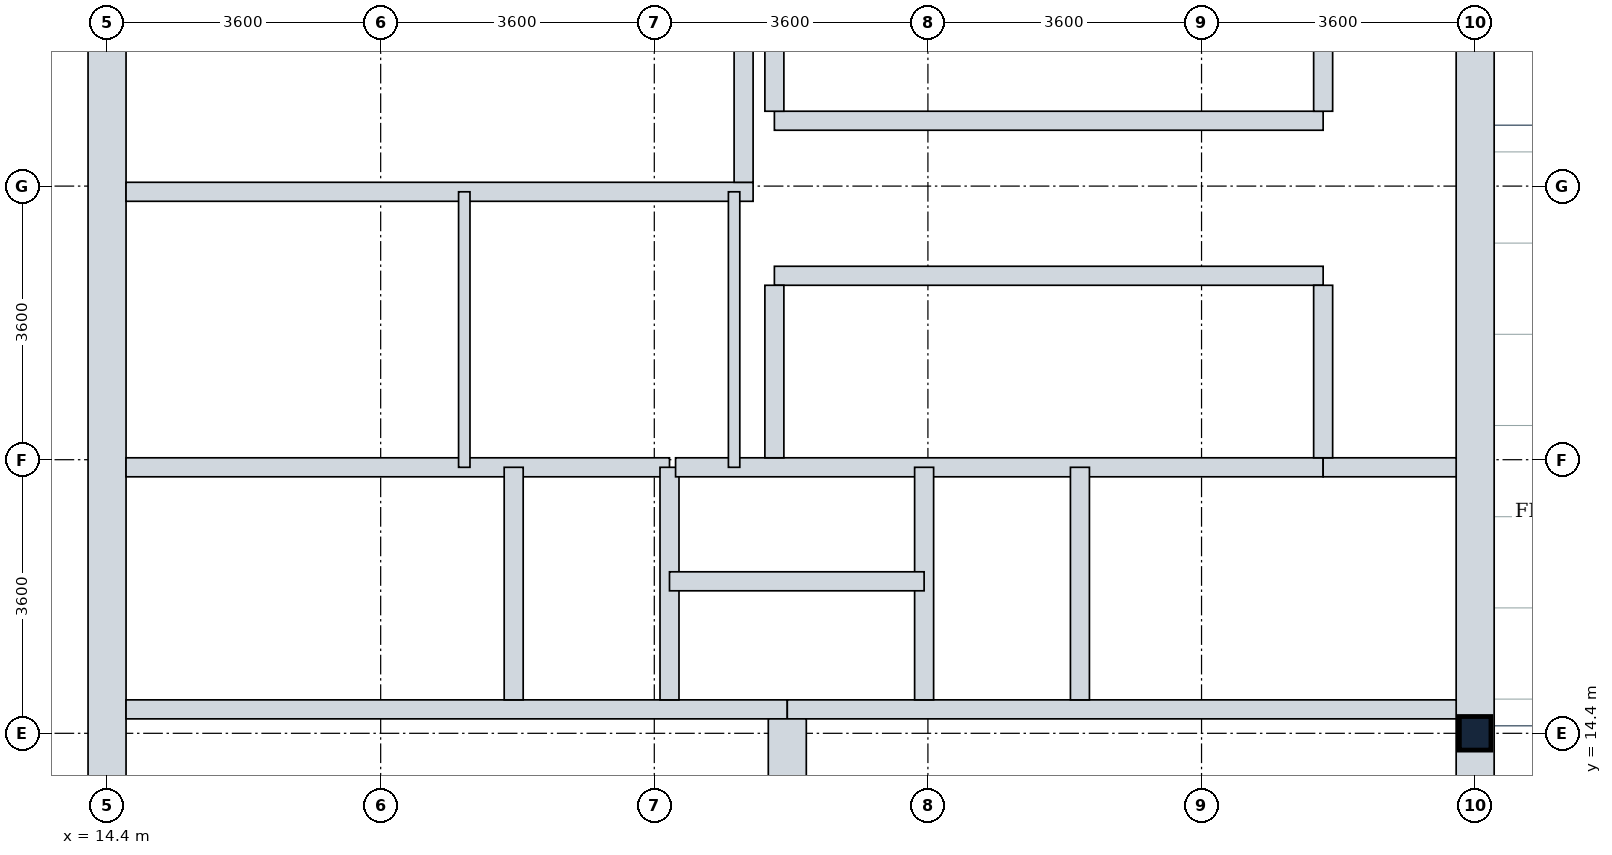
"""IFC4 building model, lengths in metres.
Left out: names, types, materials, properties, quantities, classifications, styles, units other than length and angle.
Written with IfcOpenShell. Run it as: python <this file> out.ifc"""

import sys

from ifc_helpers import new_model, si_unit, direction, frame, frame_2d, origin, origin_2d, place, context, subcontext, project, spatial, rectangle, i_section, extrude, element, fill, save


model = new_model("IFC4")
c1 = context("Model", 3, precision=1e-05, world=origin(), true_north=direction((0.0, 1.0)))
c2 = subcontext(c1, "Body", "Model", "MODEL_VIEW")
j1 = project(units=[si_unit("LENGTHUNIT", "METRE"), si_unit("PLANEANGLEUNIT", "RADIAN")], contexts=[c1])
p1 = place(None, origin())
s1 = spatial("IfcSite", under=j1, at=p1, CompositionType="ELEMENT")
p2 = place(p1, origin())
s2 = spatial("IfcBuilding", under=s1, at=p2, CompositionType="ELEMENT")
p3 = place(p2, frame((0.0, 0.0, 139.0)))
s3 = spatial("IfcBuildingStorey", under=s2, at=p3, CompositionType="ELEMENT", Elevation=139.0)
p4 = place(p3, frame((32.4, 14.4, 0.0), z_axis=(0.0, 0.0, 1.0), x_axis=(1.0, 0.0, 0.0)))
e1 = element("IfcColumn", 1, at=p4, inside=s3, PredefinedType="COLUMN", context=c2, shape_type="SweptSolid", body=[
    extrude(i_section(OverallWidth=0.416, OverallDepth=0.442, WebThickness=0.025, FlangeThickness=0.041, FilletRadius=0.015, at=origin_2d()), origin(), (0.0, 0.0, 1.0), 3.8),
])
p5 = place(p3, frame((14.4, 10.8, 0.0), z_axis=(0.0, 0.0, 1.0), x_axis=(0.0, 1.0, 0.0)))
e2 = element("IfcWall", 2, at=p5, inside=s3, PredefinedType="SHEAR", context=c2, shape_type="SweptSolid", body=[
    extrude(rectangle(XDim=14.4, YDim=0.5, at=frame_2d((7.2, 0.0))), origin(), (0.0, 0.0, 1.0), 3.55),
])
p6 = place(p5, frame((11.05, 0.0, 0.0)))
e3 = element("IfcOpeningElement", 3, at=p6, cuts=e2, PredefinedType="OPENING", context=c2, shape_type="SweptSolid", body=[
    extrude(rectangle(XDim=1.1, YDim=2.1, at=frame_2d((0.55, 1.05))), frame((0.0, 0.26, 0.0), z_axis=(0.0, -1.0, 0.0), x_axis=(1.0, 0.0, 0.0)), (0.0, 0.0, 1.0), 0.52),
])
p7 = place(p5, frame((4.9, 0.0, 0.0)))
e4 = element("IfcOpeningElement", 4, at=p7, cuts=e2, PredefinedType="OPENING", context=c2, shape_type="SweptSolid", body=[
    extrude(rectangle(XDim=1.2, YDim=2.1, at=frame_2d((0.6, 1.05))), frame((0.0, 0.26, 0.0), z_axis=(0.0, -1.0, 0.0), x_axis=(1.0, 0.0, 0.0)), (0.0, 0.0, 1.0), 0.52),
])
p8 = place(p5, frame((8.15, 0.0, 0.0)))
e5 = element("IfcOpeningElement", 5, at=p8, cuts=e2, PredefinedType="OPENING", context=c2, shape_type="SweptSolid", body=[
    extrude(rectangle(XDim=0.9, YDim=2.1, at=frame_2d((0.45, 1.05))), frame((0.0, 0.26, 0.0), z_axis=(0.0, -1.0, 0.0), x_axis=(1.0, 0.0, 0.0)), (0.0, 0.0, 1.0), 0.52),
])
p9 = place(p3, frame((32.4, 10.8, 0.0), z_axis=(0.0, 0.0, 1.0), x_axis=(0.0, 1.0, 0.0)))
e6 = element("IfcWall", 6, at=p9, inside=s3, PredefinedType="SHEAR", context=c2, shape_type="SweptSolid", body=[
    extrude(rectangle(XDim=14.4, YDim=0.5, at=frame_2d((7.2, 0.0))), origin(), (0.0, 0.0, 1.0), 3.55),
])
p10 = place(p9, frame((4.35, 0.0, 0.0)))
e7 = element("IfcOpeningElement", 7, at=p10, cuts=e6, PredefinedType="OPENING", context=c2, shape_type="SweptSolid", body=[
    extrude(rectangle(XDim=1.2, YDim=2.1, at=frame_2d((0.6, 1.05))), frame((0.0, 0.26, 0.0), z_axis=(0.0, -1.0, 0.0), x_axis=(1.0, 0.0, 0.0)), (0.0, 0.0, 1.0), 0.52),
])
p11 = place(p9, frame((10.0, 0.0, 0.0)))
e8 = element("IfcOpeningElement", 8, at=p11, cuts=e6, PredefinedType="OPENING", context=c2, shape_type="SweptSolid", body=[
    extrude(rectangle(XDim=1.2, YDim=2.1, at=frame_2d((0.6, 1.05))), frame((0.0, 0.26, 0.0), z_axis=(0.0, -1.0, 0.0), x_axis=(1.0, 0.0, 0.0)), (0.0, 0.0, 1.0), 0.52),
])
p12 = place(p3, frame((14.65, 14.715, 0.0), z_axis=(0.0, 0.0, 1.0), x_axis=(1.0, 0.0, 0.0)))
e9 = element("IfcWall", 9, at=p12, inside=s3, PredefinedType="SHEAR", context=c2, shape_type="SweptSolid", body=[
    extrude(rectangle(XDim=8.7, YDim=0.25, at=frame_2d((4.35, 0.0))), origin(), (0.0, 0.0, 1.0), 3.55),
])
p13 = place(p12, frame((0.705, 0.0, 0.0)))
e10 = element("IfcOpeningElement", 10, at=p13, cuts=e9, PredefinedType="OPENING", context=c2, shape_type="SweptSolid", body=[
    extrude(rectangle(XDim=1.1, YDim=2.1, at=frame_2d((0.55, 1.05))), frame((0.0, 0.135, 0.0), z_axis=(0.0, -1.0, 0.0), x_axis=(1.0, 0.0, 0.0)), (0.0, 0.0, 1.0), 0.27),
])
p14 = place(p3, frame((23.35, 14.715, 0.0), z_axis=(0.0, 0.0, 1.0), x_axis=(1.0, 0.0, 0.0)))
e11 = element("IfcWall", 11, at=p14, inside=s3, PredefinedType="SHEAR", context=c2, shape_type="SweptSolid", body=[
    extrude(rectangle(XDim=8.8, YDim=0.25, at=frame_2d((4.4, 0.0))), origin(), (0.0, 0.0, 1.0), 3.55),
])
p15 = place(p14, frame((6.775, 0.0, 0.0)))
e12 = element("IfcOpeningElement", 12, at=p15, cuts=e11, PredefinedType="OPENING", context=c2, shape_type="SweptSolid", body=[
    extrude(rectangle(XDim=1.1, YDim=2.1, at=frame_2d((0.55, 1.05))), frame((0.0, 0.135, 0.0), z_axis=(0.0, -1.0, 0.0), x_axis=(1.0, 0.0, 0.0)), (0.0, 0.0, 1.0), 0.27),
])
p16 = place(p3, frame((23.35, 11.75, 0.0), z_axis=(0.0, 0.0, 1.0), x_axis=(0.0, 1.0, 0.0)))
e13 = element("IfcWall", 13, at=p16, inside=s3, PredefinedType="SHEAR", context=c2, shape_type="SweptSolid", body=[
    extrude(rectangle(XDim=2.84, YDim=0.5, at=frame_2d((1.42, 0.0))), origin(), (0.0, 0.0, 1.0), 3.55),
])
p17 = place(p3, frame((14.65, 21.525, 0.0), z_axis=(0.0, 0.0, 1.0), x_axis=(1.0, 0.0, 0.0)))
e14 = element("IfcWall", 14, at=p17, inside=s3, PredefinedType="SHEAR", context=c2, shape_type="SweptSolid", body=[
    extrude(rectangle(XDim=8.25, YDim=0.25, at=frame_2d((4.125, 0.0))), origin(), (0.0, 0.0, 1.0), 3.55),
])
p18 = place(p3, frame((22.775, 21.65, 0.0), z_axis=(0.0, 0.0, 1.0), x_axis=(0.0, 1.0, 0.0)))
e15 = element("IfcWall", 15, at=p18, inside=s3, PredefinedType="SHEAR", context=c2, shape_type="SweptSolid", body=[
    extrude(rectangle(XDim=2.84, YDim=0.25, at=frame_2d((1.42, 0.0))), origin(), (0.0, 0.0, 1.0), 3.55),
])
p19 = place(p3, frame((14.65, 17.9, 0.0), z_axis=(0.0, 0.0, 1.0), x_axis=(1.0, 0.0, 0.0)))
e16 = element("IfcWall", 16, at=p19, inside=s3, PredefinedType="PARTITIONING", context=c2, shape_type="SweptSolid", body=[
    extrude(rectangle(XDim=7.15, YDim=0.25, at=frame_2d((3.575, 0.0))), origin(), (0.0, 0.0, 1.0), 3.535),
])
p20 = place(p3, frame((19.75, 14.84, 0.0), z_axis=(0.0, 0.0, 1.0), x_axis=(0.0, 1.0, 0.0)))
e17 = element("IfcWall", 17, at=p20, inside=s3, PredefinedType="PARTITIONING", context=c2, shape_type="SweptSolid", body=[
    extrude(rectangle(XDim=3.06, YDim=0.25, at=frame_2d((1.53, 0.0))), origin(), (0.0, 0.0, 1.0), 3.535),
])
p21 = place(p20, frame((0.98, 0.0, 0.0)))
e18 = element("IfcOpeningElement", 18, at=p21, cuts=e17, PredefinedType="OPENING", context=c2, shape_type="SweptSolid", body=[
    extrude(rectangle(XDim=1.1, YDim=2.1, at=frame_2d((0.55, 1.05))), frame((0.0, 0.135, 0.0), z_axis=(0.0, -1.0, 0.0), x_axis=(1.0, 0.0, 0.0)), (0.0, 0.0, 1.0), 0.27),
])
p22 = place(p3, frame((21.8, 14.84, 0.0), z_axis=(0.0, 0.0, 1.0), x_axis=(0.0, 1.0, 0.0)))
e19 = element("IfcWall", 19, at=p22, inside=s3, PredefinedType="PARTITIONING", context=c2, shape_type="SweptSolid", body=[
    extrude(rectangle(XDim=3.06, YDim=0.25, at=frame_2d((1.53, 0.0))), origin(), (0.0, 0.0, 1.0), 3.535),
])
p23 = place(p3, frame((21.88, 17.9, 0.0), z_axis=(0.0, 0.0, 1.0), x_axis=(1.0, 0.0, 0.0)))
e20 = element("IfcWall", 20, at=p23, inside=s3, PredefinedType="PARTITIONING", context=c2, shape_type="SweptSolid", body=[
    extrude(rectangle(XDim=8.52, YDim=0.25, at=frame_2d((4.26, 0.0))), origin(), (0.0, 0.0, 1.0), 3.535),
])
p24 = place(p3, frame((30.4, 17.9, 0.0), z_axis=(0.0, 0.0, 1.0), x_axis=(1.0, 0.0, 0.0)))
e21 = element("IfcWall", 21, at=p24, inside=s3, PredefinedType="PARTITIONING", context=c2, shape_type="SweptSolid", body=[
    extrude(rectangle(XDim=1.75, YDim=0.25, at=frame_2d((0.875, 0.0))), origin(), (0.0, 0.0, 1.0), 3.535),
])
p25 = place(p24, frame((0.32, 0.0, 0.0)))
e22 = element("IfcOpeningElement", 22, at=p25, cuts=e21, PredefinedType="OPENING", context=c2, shape_type="SweptSolid", body=[
    extrude(rectangle(XDim=1.1, YDim=2.1, at=frame_2d((0.55, 1.05))), frame((0.0, 0.135, 0.0), z_axis=(0.0, -1.0, 0.0), x_axis=(1.0, 0.0, 0.0)), (0.0, 0.0, 1.0), 0.27),
])
p26 = place(p3, frame((25.15, 14.84, 0.0), z_axis=(0.0, 0.0, 1.0), x_axis=(0.0, 1.0, 0.0)))
e23 = element("IfcWall", 23, at=p26, inside=s3, PredefinedType="PARTITIONING", context=c2, shape_type="SweptSolid", body=[
    extrude(rectangle(XDim=3.06, YDim=0.25, at=frame_2d((1.53, 0.0))), origin(), (0.0, 0.0, 1.0), 3.535),
])
p27 = place(p3, frame((27.2, 14.84, 0.0), z_axis=(0.0, 0.0, 1.0), x_axis=(0.0, 1.0, 0.0)))
e24 = element("IfcWall", 24, at=p27, inside=s3, PredefinedType="PARTITIONING", context=c2, shape_type="SweptSolid", body=[
    extrude(rectangle(XDim=3.06, YDim=0.25, at=frame_2d((1.53, 0.0))), origin(), (0.0, 0.0, 1.0), 3.535),
])
p28 = place(p27, frame((0.98, 0.0, 0.0)))
e25 = element("IfcOpeningElement", 25, at=p28, cuts=e24, PredefinedType="OPENING", context=c2, shape_type="SweptSolid", body=[
    extrude(rectangle(XDim=1.1, YDim=2.1, at=frame_2d((0.55, 1.05))), frame((0.0, 0.135, 0.0), z_axis=(0.0, -1.0, 0.0), x_axis=(1.0, 0.0, 0.0)), (0.0, 0.0, 1.0), 0.27),
])
p29 = place(p3, frame((21.8, 16.4, 0.0), z_axis=(0.0, 0.0, 1.0), x_axis=(1.0, 0.0, 0.0)))
e26 = element("IfcWall", 26, at=p29, inside=s3, PredefinedType="PARTITIONING", context=c2, shape_type="SweptSolid", body=[
    extrude(rectangle(XDim=3.35, YDim=0.25, at=frame_2d((1.675, 0.0))), origin(), (0.0, 0.0, 1.0), 3.535),
])
p30 = place(p3, frame((23.18, 20.42, 0.0), z_axis=(0.0, 0.0, 1.0), x_axis=(1.0, 0.0, 0.0)))
e27 = element("IfcWall", 27, at=p30, inside=s3, PredefinedType="PARTITIONING", context=c2, shape_type="SweptSolid", body=[
    extrude(rectangle(XDim=7.22, YDim=0.25, at=frame_2d((3.61, 0.0))), origin(), (0.0, 0.0, 1.0), 3.535),
])
p31 = place(p30, frame((0.41, 0.0, 0.0)))
e28 = element("IfcOpeningElement", 28, at=p31, cuts=e27, PredefinedType="OPENING", context=c2, shape_type="SweptSolid", body=[
    extrude(rectangle(XDim=1.1, YDim=2.1, at=frame_2d((0.55, 1.05))), frame((0.0, 0.135, 0.0), z_axis=(0.0, -1.0, 0.0), x_axis=(1.0, 0.0, 0.0)), (0.0, 0.0, 1.0), 0.27),
])
p32 = place(p30, frame((2.19, 0.0, 0.0)))
e29 = element("IfcOpeningElement", 29, at=p32, cuts=e27, PredefinedType="OPENING", context=c2, shape_type="SweptSolid", body=[
    extrude(rectangle(XDim=1.1, YDim=2.1, at=frame_2d((0.55, 1.05))), frame((0.0, 0.135, 0.0), z_axis=(0.0, -1.0, 0.0), x_axis=(1.0, 0.0, 0.0)), (0.0, 0.0, 1.0), 0.27),
])
p33 = place(p30, frame((3.97, 0.0, 0.0)))
e30 = element("IfcOpeningElement", 30, at=p33, cuts=e27, PredefinedType="OPENING", context=c2, shape_type="SweptSolid", body=[
    extrude(rectangle(XDim=1.1, YDim=2.1, at=frame_2d((0.55, 1.05))), frame((0.0, 0.135, 0.0), z_axis=(0.0, -1.0, 0.0), x_axis=(1.0, 0.0, 0.0)), (0.0, 0.0, 1.0), 0.27),
])
p34 = place(p30, frame((5.75, 0.0, 0.0)))
e31 = element("IfcOpeningElement", 31, at=p34, cuts=e27, PredefinedType="OPENING", context=c2, shape_type="SweptSolid", body=[
    extrude(rectangle(XDim=1.1, YDim=2.1, at=frame_2d((0.55, 1.05))), frame((0.0, 0.135, 0.0), z_axis=(0.0, -1.0, 0.0), x_axis=(1.0, 0.0, 0.0)), (0.0, 0.0, 1.0), 0.27),
])
for number, where, z_axis, x_axis in (
    (32, (23.18, 18.025, 0.0), (0.0, 0.0, 1.0), (0.0, 1.0, 0.0)),
    (33, (30.4, 18.025, 0.0), (0.0, 0.0, 1.0), (0.0, 1.0, 0.0)),
):
    element("IfcWall", number, at=place(p3, frame(where, z_axis=z_axis, x_axis=x_axis)), inside=s3, PredefinedType="PARTITIONING", context=c2, shape_type="SweptSolid", body=[
        extrude(rectangle(XDim=2.27, YDim=0.25, at=frame_2d((1.135, 0.0))), origin(), (0.0, 0.0, 1.0), 3.535),
    ])
p35 = place(p3, frame((23.18, 22.46, 0.0), z_axis=(0.0, 0.0, 1.0), x_axis=(1.0, 0.0, 0.0)))
e34 = element("IfcWall", 34, at=p35, inside=s3, PredefinedType="PARTITIONING", context=c2, shape_type="SweptSolid", body=[
    extrude(rectangle(XDim=7.22, YDim=0.25, at=frame_2d((3.61, 0.0))), origin(), (0.0, 0.0, 1.0), 3.535),
])
for number, where, z_axis, x_axis in (
    (35, (23.18, 22.585, 0.0), (0.0, 0.0, 1.0), (0.0, 1.0, 0.0)),
    (36, (30.4, 22.585, 0.0), (0.0, 0.0, 1.0), (0.0, 1.0, 0.0)),
):
    element("IfcWall", number, at=place(p3, frame(where, z_axis=z_axis, x_axis=x_axis)), inside=s3, PredefinedType="PARTITIONING", context=c2, shape_type="SweptSolid", body=[
        extrude(rectangle(XDim=2.315, YDim=0.25, at=frame_2d((1.157, 0.0))), origin(), (0.0, 0.0, 1.0), 3.535),
    ])
p36 = place(p3, frame((22.65, 17.9, 0.0), z_axis=(0.0, 0.0, 1.0), x_axis=(0.0, 1.0, 0.0)))
e37 = element("IfcWall", 37, at=p36, inside=s3, PredefinedType="PARTITIONING", context=c2, shape_type="SweptSolid", body=[
    extrude(rectangle(XDim=3.625, YDim=0.15, at=frame_2d((1.812, 0.0))), origin(), (0.0, 0.0, 1.0), 3.535),
])
p37 = place(p36, frame((2.1, 0.0, 0.0)))
e38 = element("IfcOpeningElement", 38, at=p37, cuts=e37, PredefinedType="OPENING", context=c2, shape_type="SweptSolid", body=[
    extrude(rectangle(XDim=0.9, YDim=2.1, at=frame_2d((0.45, 1.05))), frame((0.0, 0.085, 0.0), z_axis=(0.0, -1.0, 0.0), x_axis=(1.0, 0.0, 0.0)), (0.0, 0.0, 1.0), 0.17),
])
p38 = place(p3, frame((19.1, 17.9, 0.0), z_axis=(0.0, 0.0, 1.0), x_axis=(0.0, 1.0, 0.0)))
e39 = element("IfcWall", 39, at=p38, inside=s3, PredefinedType="PARTITIONING", context=c2, shape_type="SweptSolid", body=[
    extrude(rectangle(XDim=3.625, YDim=0.15, at=frame_2d((1.812, 0.0))), origin(), (0.0, 0.0, 1.0), 3.535),
])
p39 = place(p13, origin())
e40 = element("IfcDoor", 40, at=p39, inside=s3, OperationType="SINGLE_SWING_LEFT", PredefinedType="DOOR", context=c2, shape_type="SweptSolid", body=[
    extrude(rectangle(XDim=1.1, YDim=2.1, at=frame_2d((0.55, 1.05))), frame((0.0, 0.025, 0.0), z_axis=(0.0, -1.0, 0.0), x_axis=(1.0, 0.0, 0.0)), (0.0, 0.0, 1.0), 0.05),
])
fill(e10, e40)
p40 = place(p15, origin())
e41 = element("IfcDoor", 41, at=p40, inside=s3, OperationType="SINGLE_SWING_LEFT", PredefinedType="DOOR", context=c2, shape_type="SweptSolid", body=[
    extrude(rectangle(XDim=1.1, YDim=2.1, at=frame_2d((0.55, 1.05))), frame((0.0, 0.025, 0.0), z_axis=(0.0, -1.0, 0.0), x_axis=(1.0, 0.0, 0.0)), (0.0, 0.0, 1.0), 0.05),
])
fill(e12, e41)
p41 = place(p6, origin())
e42 = element("IfcDoor", 42, at=p41, inside=s3, OperationType="SINGLE_SWING_RIGHT", PredefinedType="DOOR", context=c2, shape_type="SweptSolid", body=[
    extrude(rectangle(XDim=1.1, YDim=2.1, at=frame_2d((0.55, 1.05))), frame((0.0, 0.025, 0.0), z_axis=(0.0, -1.0, 0.0), x_axis=(1.0, 0.0, 0.0)), (0.0, 0.0, 1.0), 0.05),
])
fill(e3, e42)
p42 = place(p21, origin())
e43 = element("IfcDoor", 43, at=p42, inside=s3, OperationType="SLIDING_TO_LEFT", PredefinedType="DOOR", context=c2, shape_type="SweptSolid", body=[
    extrude(rectangle(XDim=1.1, YDim=2.1, at=frame_2d((0.55, 1.05))), frame((0.0, 0.025, 0.0), z_axis=(0.0, -1.0, 0.0), x_axis=(1.0, 0.0, 0.0)), (0.0, 0.0, 1.0), 0.05),
])
fill(e18, e43)
p43 = place(p28, origin())
e44 = element("IfcDoor", 44, at=p43, inside=s3, OperationType="SLIDING_TO_LEFT", PredefinedType="DOOR", context=c2, shape_type="SweptSolid", body=[
    extrude(rectangle(XDim=1.1, YDim=2.1, at=frame_2d((0.55, 1.05))), frame((0.0, 0.025, 0.0), z_axis=(0.0, -1.0, 0.0), x_axis=(1.0, 0.0, 0.0)), (0.0, 0.0, 1.0), 0.05),
])
fill(e25, e44)
p44 = place(p7, origin())
e45 = element("IfcDoor", 45, at=p44, inside=s3, OperationType="SINGLE_SWING_RIGHT", PredefinedType="DOOR", context=c2, shape_type="SweptSolid", body=[
    extrude(rectangle(XDim=1.2, YDim=2.1, at=frame_2d((0.6, 1.05))), frame((0.0, 0.025, 0.0), z_axis=(0.0, -1.0, 0.0), x_axis=(1.0, 0.0, 0.0)), (0.0, 0.0, 1.0), 0.05),
])
fill(e4, e45)
p45 = place(p10, origin())
e46 = element("IfcDoor", 46, at=p45, inside=s3, OperationType="SINGLE_SWING_LEFT", PredefinedType="DOOR", context=c2, shape_type="SweptSolid", body=[
    extrude(rectangle(XDim=1.2, YDim=2.1, at=frame_2d((0.6, 1.05))), frame((0.0, 0.025, 0.0), z_axis=(0.0, -1.0, 0.0), x_axis=(1.0, 0.0, 0.0)), (0.0, 0.0, 1.0), 0.05),
])
fill(e7, e46)
p46 = place(p25, origin())
e47 = element("IfcDoor", 47, at=p46, inside=s3, OperationType="SINGLE_SWING_LEFT", PredefinedType="DOOR", context=c2, shape_type="SweptSolid", body=[
    extrude(rectangle(XDim=1.1, YDim=2.1, at=frame_2d((0.55, 1.05))), frame((0.0, 0.025, 0.0), z_axis=(0.0, -1.0, 0.0), x_axis=(1.0, 0.0, 0.0)), (0.0, 0.0, 1.0), 0.05),
])
fill(e22, e47)
p47 = place(p31, origin())
e48 = element("IfcDoor", 48, at=p47, inside=s3, OperationType="SLIDING_TO_LEFT", PredefinedType="DOOR", context=c2, shape_type="SweptSolid", body=[
    extrude(rectangle(XDim=1.1, YDim=2.1, at=frame_2d((0.55, 1.05))), frame((0.0, 0.025, 0.0), z_axis=(0.0, -1.0, 0.0), x_axis=(1.0, 0.0, 0.0)), (0.0, 0.0, 1.0), 0.05),
])
fill(e28, e48)
p48 = place(p32, origin())
e49 = element("IfcDoor", 49, at=p48, inside=s3, OperationType="SLIDING_TO_LEFT", PredefinedType="DOOR", context=c2, shape_type="SweptSolid", body=[
    extrude(rectangle(XDim=1.1, YDim=2.1, at=frame_2d((0.55, 1.05))), frame((0.0, 0.025, 0.0), z_axis=(0.0, -1.0, 0.0), x_axis=(1.0, 0.0, 0.0)), (0.0, 0.0, 1.0), 0.05),
])
fill(e29, e49)
p49 = place(p33, origin())
e50 = element("IfcDoor", 50, at=p49, inside=s3, OperationType="SLIDING_TO_LEFT", PredefinedType="DOOR", context=c2, shape_type="SweptSolid", body=[
    extrude(rectangle(XDim=1.1, YDim=2.1, at=frame_2d((0.55, 1.05))), frame((0.0, 0.025, 0.0), z_axis=(0.0, -1.0, 0.0), x_axis=(1.0, 0.0, 0.0)), (0.0, 0.0, 1.0), 0.05),
])
fill(e30, e50)
p50 = place(p34, origin())
e51 = element("IfcDoor", 51, at=p50, inside=s3, OperationType="SLIDING_TO_LEFT", PredefinedType="DOOR", context=c2, shape_type="SweptSolid", body=[
    extrude(rectangle(XDim=1.1, YDim=2.1, at=frame_2d((0.55, 1.05))), frame((0.0, 0.025, 0.0), z_axis=(0.0, -1.0, 0.0), x_axis=(1.0, 0.0, 0.0)), (0.0, 0.0, 1.0), 0.05),
])
fill(e31, e51)
p51 = place(p11, origin())
e52 = element("IfcDoor", 52, at=p51, inside=s3, OperationType="SINGLE_SWING_RIGHT", PredefinedType="DOOR", context=c2, shape_type="SweptSolid", body=[
    extrude(rectangle(XDim=1.2, YDim=2.1, at=frame_2d((0.6, 1.05))), frame((0.0, 0.025, 0.0), z_axis=(0.0, -1.0, 0.0), x_axis=(1.0, 0.0, 0.0)), (0.0, 0.0, 1.0), 0.05),
])
fill(e8, e52)
p52 = place(p8, origin())
e53 = element("IfcDoor", 53, at=p52, inside=s3, OperationType="SINGLE_SWING_RIGHT", PredefinedType="DOOR", context=c2, shape_type="SweptSolid", body=[
    extrude(rectangle(XDim=0.9, YDim=2.1, at=frame_2d((0.45, 1.05))), frame((0.0, 0.025, 0.0), z_axis=(0.0, -1.0, 0.0), x_axis=(1.0, 0.0, 0.0)), (0.0, 0.0, 1.0), 0.05),
])
fill(e5, e53)
p53 = place(p37, origin())
e54 = element("IfcDoor", 54, at=p53, inside=s3, OperationType="SINGLE_SWING_LEFT", PredefinedType="DOOR", context=c2, shape_type="SweptSolid", body=[
    extrude(rectangle(XDim=0.9, YDim=2.1, at=frame_2d((0.45, 1.05))), frame((0.0, 0.025, 0.0), z_axis=(0.0, -1.0, 0.0), x_axis=(1.0, 0.0, 0.0)), (0.0, 0.0, 1.0), 0.05),
])
fill(e38, e54)
save(model, sys.argv[1])
